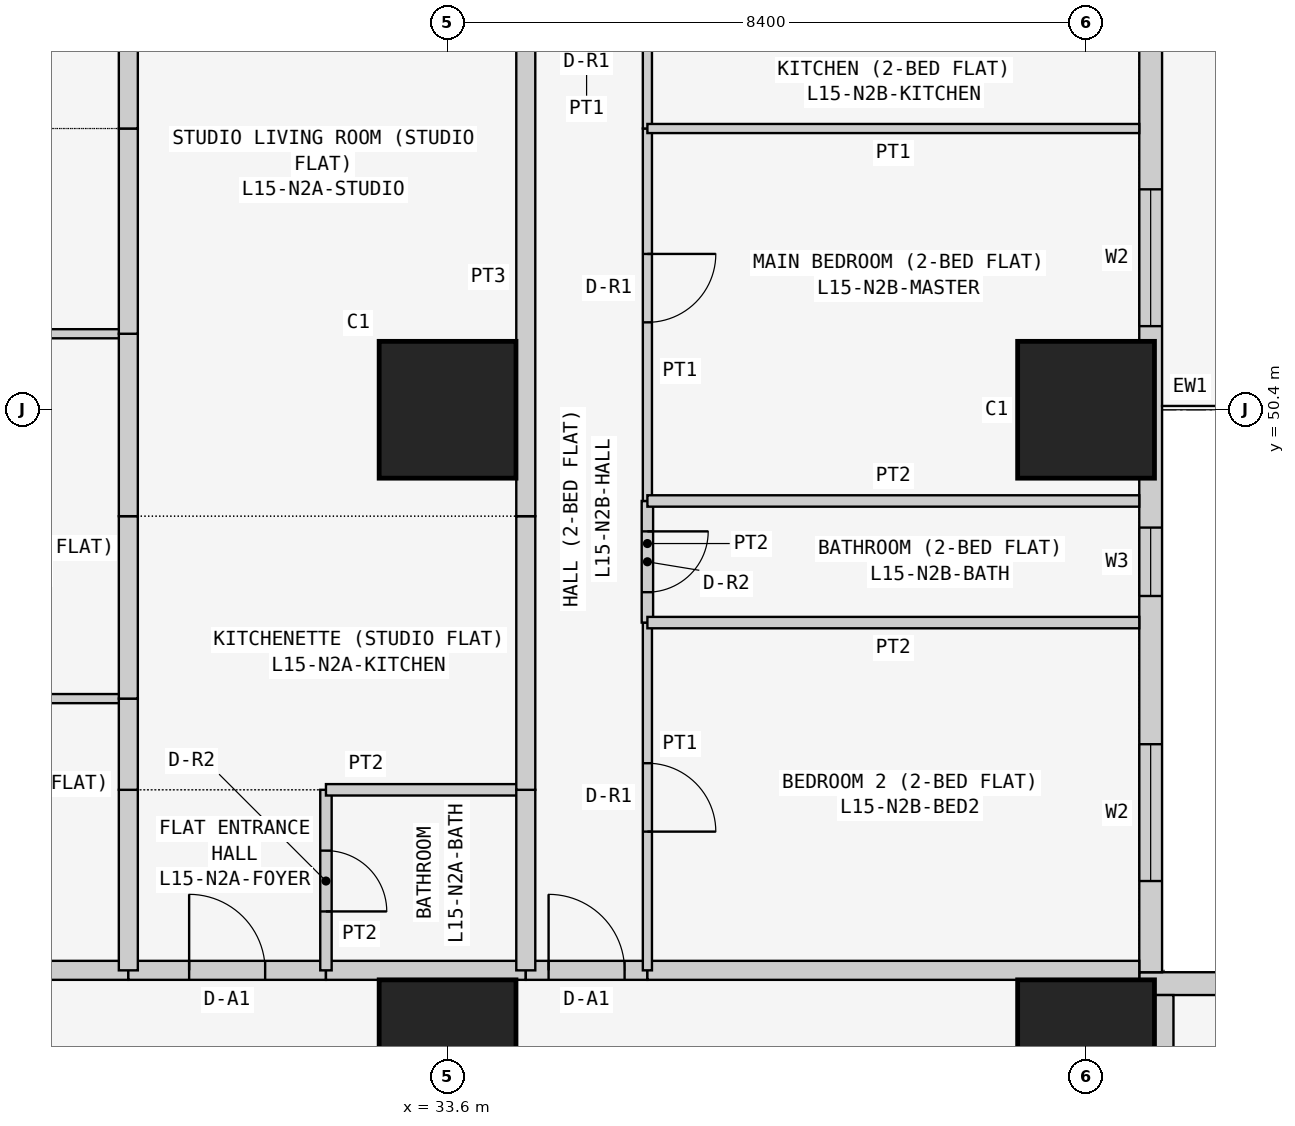
"""IFC4 building model, lengths in metres.
Left out: names, types, materials, properties, quantities, classifications, styles, units other than length and angle.
Written with IfcOpenShell. Run it as: python <this file> out.ifc"""

import sys

from ifc_helpers import new_model, si_unit, direction, frame, frame_2d, origin, origin_2d, place, context, subcontext, project, spatial, rectangle, extrude, element, fill, save


model = new_model("IFC4")
c1 = context("Model", 3, precision=1e-05, world=origin(), true_north=direction((0.0, 1.0)))
c2 = subcontext(c1, "Body", "Model", "MODEL_VIEW")
j1 = project(units=[si_unit("LENGTHUNIT", "METRE"), si_unit("PLANEANGLEUNIT", "RADIAN")], contexts=[c1])
p1 = place(None, origin())
s1 = spatial("IfcSite", under=j1, at=p1, CompositionType="ELEMENT")
p2 = place(p1, origin())
s2 = spatial("IfcBuilding", under=s1, at=p2, CompositionType="ELEMENT")
p3 = place(p2, frame((0.0, 0.0, 63.3)))
s3 = spatial("IfcBuildingStorey", under=s2, at=p3, CompositionType="ELEMENT", Elevation=63.3)
for number, where, z_axis, x_axis in (
    (1, (33.6, 42.0, 0.0), (0.0, 0.0, 1.0), (1.0, 0.0, 0.0)),
    (2, (33.6, 50.4, 0.0), (0.0, 0.0, 1.0), (1.0, 0.0, 0.0)),
    (3, (42.0, 42.0, 0.0), (0.0, 0.0, 1.0), (1.0, 0.0, 0.0)),
    (4, (42.0, 50.4, 0.0), (0.0, 0.0, 1.0), (1.0, 0.0, 0.0)),
):
    element("IfcColumn", number, at=place(p3, frame(where, z_axis=z_axis, x_axis=x_axis)), inside=s3, PredefinedType="COLUMN", context=c2, shape_type="SweptSolid", body=[
        extrude(rectangle(XDim=1.8, YDim=1.8, at=origin_2d()), origin(), (0.0, 0.0, 1.0), 3.6),
    ])
p4 = place(p3, frame((58.4, 42.85, 0.0), z_axis=(0.0, 0.0, 1.0), x_axis=(-1.0, 0.0, 0.0)))
e5 = element("IfcWall", 5, at=p4, inside=s3, PredefinedType="SOLIDWALL", context=c2, shape_type="SweptSolid", body=[
    extrude(rectangle(XDim=15.7, YDim=0.3, at=frame_2d((7.85, 0.0))), origin(), (0.0, 0.0, 1.0), 3.45),
])
p5 = place(p4, frame((12.4, 0.0, 0.9)))
e6 = element("IfcOpeningElement", 6, at=p5, cuts=e5, PredefinedType="OPENING", context=c2, shape_type="SweptSolid", body=[
    extrude(rectangle(XDim=1.8, YDim=1.5, at=frame_2d((0.9, 0.75))), frame((0.0, 0.16, 0.0), z_axis=(0.0, -1.0, 0.0), x_axis=(1.0, 0.0, 0.0)), (0.0, 0.0, 1.0), 0.32),
])
p6 = place(p4, frame((9.55, 0.0, 1.5)))
e7 = element("IfcOpeningElement", 7, at=p6, cuts=e5, PredefinedType="OPENING", context=c2, shape_type="SweptSolid", body=[
    extrude(rectangle(XDim=0.9, YDim=0.7, at=frame_2d((0.45, 0.35))), frame((0.0, 0.16, 0.0), z_axis=(0.0, -1.0, 0.0), x_axis=(1.0, 0.0, 0.0)), (0.0, 0.0, 1.0), 0.32),
])
p7 = place(p4, frame((5.1, 0.0, 0.9)))
e8 = element("IfcOpeningElement", 8, at=p7, cuts=e5, PredefinedType="OPENING", context=c2, shape_type="SweptSolid", body=[
    extrude(rectangle(XDim=1.8, YDim=1.5, at=frame_2d((0.9, 0.75))), frame((0.0, 0.16, 0.0), z_axis=(0.0, -1.0, 0.0), x_axis=(1.0, 0.0, 0.0)), (0.0, 0.0, 1.0), 0.32),
])
p8 = place(p4, frame((2.0, 0.0, 0.0)))
e9 = element("IfcOpeningElement", 9, at=p8, cuts=e5, PredefinedType="OPENING", context=c2, shape_type="SweptSolid", body=[
    extrude(rectangle(XDim=0.9, YDim=2.4, at=frame_2d((0.45, 1.2))), frame((0.0, 0.16, 0.0), z_axis=(0.0, -1.0, 0.0), x_axis=(1.0, 0.0, 0.0)), (0.0, 0.0, 1.0), 0.32),
])
p9 = place(p4, frame((0.7, 0.0, 0.9)))
e10 = element("IfcOpeningElement", 10, at=p9, cuts=e5, PredefinedType="OPENING", context=c2, shape_type="SweptSolid", body=[
    extrude(rectangle(XDim=1.2, YDim=1.5, at=frame_2d((0.6, 0.75))), frame((0.0, 0.16, 0.0), z_axis=(0.0, -1.0, 0.0), x_axis=(1.0, 0.0, 0.0)), (0.0, 0.0, 1.0), 0.32),
])
p10 = place(p3, frame((42.85, 43.0, 0.0), z_axis=(0.0, 0.0, 1.0), x_axis=(0.0, 1.0, 0.0)))
e11 = element("IfcWall", 11, at=p10, inside=s3, PredefinedType="SOLIDWALL", context=c2, shape_type="SweptSolid", body=[
    extrude(rectangle(XDim=15.4, YDim=0.3, at=frame_2d((7.7, 0.0))), origin(), (0.0, 0.0, 1.0), 3.45),
])
p11 = place(p10, frame((1.2, 0.0, 0.9)))
e12 = element("IfcOpeningElement", 12, at=p11, cuts=e11, PredefinedType="OPENING", context=c2, shape_type="SweptSolid", body=[
    extrude(rectangle(XDim=1.8, YDim=1.5, at=frame_2d((0.9, 0.75))), frame((0.0, 0.16, 0.0), z_axis=(0.0, -1.0, 0.0), x_axis=(1.0, 0.0, 0.0)), (0.0, 0.0, 1.0), 0.32),
])
p12 = place(p10, frame((4.95, 0.0, 1.5)))
e13 = element("IfcOpeningElement", 13, at=p12, cuts=e11, PredefinedType="OPENING", context=c2, shape_type="SweptSolid", body=[
    extrude(rectangle(XDim=0.9, YDim=0.7, at=frame_2d((0.45, 0.35))), frame((0.0, 0.16, 0.0), z_axis=(0.0, -1.0, 0.0), x_axis=(1.0, 0.0, 0.0)), (0.0, 0.0, 1.0), 0.32),
])
p13 = place(p10, frame((8.5, 0.0, 0.9)))
e14 = element("IfcOpeningElement", 14, at=p13, cuts=e11, PredefinedType="OPENING", context=c2, shape_type="SweptSolid", body=[
    extrude(rectangle(XDim=1.8, YDim=1.5, at=frame_2d((0.9, 0.75))), frame((0.0, 0.16, 0.0), z_axis=(0.0, -1.0, 0.0), x_axis=(1.0, 0.0, 0.0)), (0.0, 0.0, 1.0), 0.32),
])
p14 = place(p10, frame((12.5, 0.0, 0.0)))
e15 = element("IfcOpeningElement", 15, at=p14, cuts=e11, PredefinedType="OPENING", context=c2, shape_type="SweptSolid", body=[
    extrude(rectangle(XDim=0.9, YDim=2.4, at=frame_2d((0.45, 1.2))), frame((0.0, 0.16, 0.0), z_axis=(0.0, -1.0, 0.0), x_axis=(1.0, 0.0, 0.0)), (0.0, 0.0, 1.0), 0.32),
])
p15 = place(p10, frame((13.5, 0.0, 0.9)))
e16 = element("IfcOpeningElement", 16, at=p15, cuts=e11, PredefinedType="OPENING", context=c2, shape_type="SweptSolid", body=[
    extrude(rectangle(XDim=1.2, YDim=1.5, at=frame_2d((0.6, 0.75))), frame((0.0, 0.16, 0.0), z_axis=(0.0, -1.0, 0.0), x_axis=(1.0, 0.0, 0.0)), (0.0, 0.0, 1.0), 0.32),
])
p16 = place(p3, frame((24.171, 43.025, 0.0), z_axis=(0.0, 0.0, 1.0), x_axis=(1.0, 0.0, 0.0)))
e17 = element("IfcWall", 17, at=p16, inside=s3, PredefinedType="PARTITIONING", context=c2, shape_type="SweptSolid", body=[
    extrude(rectangle(XDim=5.229, YDim=0.25, at=frame_2d((2.615, 0.0))), origin(), (0.0, 0.0, 1.0), 3.45),
])
p17 = place(p16, frame((2.129, 0.0, 0.0)))
e18 = element("IfcOpeningElement", 18, at=p17, cuts=e17, PredefinedType="OPENING", context=c2, shape_type="SweptSolid", body=[
    extrude(rectangle(XDim=1.0, YDim=2.1, at=frame_2d((0.5, 1.05))), frame((0.0, 0.135, 0.0), z_axis=(0.0, -1.0, 0.0), x_axis=(1.0, 0.0, 0.0)), (0.0, 0.0, 1.0), 0.27),
])
p18 = place(p3, frame((29.4, 43.025, 0.0), z_axis=(0.0, 0.0, 1.0), x_axis=(1.0, 0.0, 0.0)))
e19 = element("IfcWall", 19, at=p18, inside=s3, PredefinedType="PARTITIONING", context=c2, shape_type="SweptSolid", body=[
    extrude(rectangle(XDim=2.6, YDim=0.25, at=frame_2d((1.3, 0.0))), origin(), (0.0, 0.0, 1.0), 3.45),
])
p19 = place(p18, frame((0.8, 0.0, 0.0)))
e20 = element("IfcOpeningElement", 20, at=p19, cuts=e19, PredefinedType="OPENING", context=c2, shape_type="SweptSolid", body=[
    extrude(rectangle(XDim=1.0, YDim=2.1, at=frame_2d((0.5, 1.05))), frame((0.0, 0.135, 0.0), z_axis=(0.0, -1.0, 0.0), x_axis=(1.0, 0.0, 0.0)), (0.0, 0.0, 1.0), 0.27),
])
p20 = place(p3, frame((32.0, 43.025, 0.0), z_axis=(0.0, 0.0, 1.0), x_axis=(1.0, 0.0, 0.0)))
e21 = element("IfcWall", 21, at=p20, inside=s3, PredefinedType="PARTITIONING", context=c2, shape_type="SweptSolid", body=[
    extrude(rectangle(XDim=2.629, YDim=0.25, at=frame_2d((1.314, 0.0))), origin(), (0.0, 0.0, 1.0), 3.45),
])
p21 = place(p3, frame((34.629, 43.025, 0.0), z_axis=(0.0, 0.0, 1.0), x_axis=(1.0, 0.0, 0.0)))
e22 = element("IfcWall", 22, at=p21, inside=s3, PredefinedType="PARTITIONING", context=c2, shape_type="SweptSolid", body=[
    extrude(rectangle(XDim=1.6, YDim=0.25, at=frame_2d((0.8, 0.0))), origin(), (0.0, 0.0, 1.0), 3.45),
])
p22 = place(p21, frame((0.3, 0.0, 0.0)))
e23 = element("IfcOpeningElement", 23, at=p22, cuts=e22, PredefinedType="OPENING", context=c2, shape_type="SweptSolid", body=[
    extrude(rectangle(XDim=1.0, YDim=2.1, at=frame_2d((0.5, 1.05))), frame((0.0, 0.135, 0.0), z_axis=(0.0, -1.0, 0.0), x_axis=(1.0, 0.0, 0.0)), (0.0, 0.0, 1.0), 0.27),
])
p23 = place(p3, frame((36.229, 43.025, 0.0), z_axis=(0.0, 0.0, 1.0), x_axis=(1.0, 0.0, 0.0)))
e24 = element("IfcWall", 24, at=p23, inside=s3, PredefinedType="PARTITIONING", context=c2, shape_type="SweptSolid", body=[
    extrude(rectangle(XDim=6.471, YDim=0.25, at=frame_2d((3.235, 0.0))), origin(), (0.0, 0.0, 1.0), 3.45),
])
p24 = place(p3, frame((43.025, 42.7, 0.0), z_axis=(0.0, 0.0, 1.0), x_axis=(0.0, -1.0, 0.0)))
e25 = element("IfcWall", 25, at=p24, inside=s3, PredefinedType="PARTITIONING", context=c2, shape_type="SweptSolid", body=[
    extrude(rectangle(XDim=6.871, YDim=0.25, at=frame_2d((3.436, 0.0))), origin(), (0.0, 0.0, 1.0), 3.45),
])
p25 = place(p3, frame((29.4, 46.6, 0.0), z_axis=(0.0, 0.0, 1.0), x_axis=(-1.0, 0.0, 0.0)))
e26 = element("IfcWall", 26, at=p25, inside=s3, PredefinedType="PARTITIONING", context=c2, shape_type="SweptSolid", body=[
    extrude(rectangle(XDim=5.229, YDim=0.12, at=frame_2d((2.615, 0.0))), origin(), (0.0, 0.0, 1.0), 3.45),
])
p26 = place(p3, frame((29.4, 43.025, 0.0), z_axis=(0.0, 0.0, 1.0), x_axis=(0.0, 1.0, 0.0)))
e27 = element("IfcWall", 27, at=p26, inside=s3, PredefinedType="PARTITIONING", context=c2, shape_type="SweptSolid", body=[
    extrude(rectangle(XDim=2.375, YDim=0.25, at=frame_2d((1.188, 0.0))), origin(), (0.0, 0.0, 1.0), 2.848),
])
p27 = place(p3, frame((29.4, 45.4, 0.0), z_axis=(0.0, 0.0, 1.0), x_axis=(0.0, 1.0, 0.0)))
e28 = element("IfcWall", 28, at=p27, inside=s3, PredefinedType="PARTITIONING", context=c2, shape_type="SweptSolid", body=[
    extrude(rectangle(XDim=1.2, YDim=0.25, at=frame_2d((0.6, 0.0))), origin(), (0.0, 0.0, 1.0), 2.848),
])
p28 = place(p3, frame((29.4, 51.4, 0.0), z_axis=(0.0, 0.0, 1.0), x_axis=(-1.0, 0.0, 0.0)))
e29 = element("IfcWall", 29, at=p28, inside=s3, PredefinedType="PARTITIONING", context=c2, shape_type="SweptSolid", body=[
    extrude(rectangle(XDim=5.229, YDim=0.12, at=frame_2d((2.615, 0.0))), origin(), (0.0, 0.0, 1.0), 3.45),
])
for number, where, z_axis, x_axis in (
    (30, (29.4, 46.6, 0.0), (0.0, 0.0, 1.0), (0.0, 1.0, 0.0)),
    (31, (29.4, 49.0, 0.0), (0.0, 0.0, 1.0), (0.0, 1.0, 0.0)),
):
    element("IfcWall", number, at=place(p3, frame(where, z_axis=z_axis, x_axis=x_axis)), inside=s3, PredefinedType="PARTITIONING", context=c2, shape_type="SweptSolid", body=[
        extrude(rectangle(XDim=2.4, YDim=0.25, at=frame_2d((1.2, 0.0))), origin(), (0.0, 0.0, 1.0), 2.848),
    ])
p29 = place(p3, frame((29.4, 51.4, 0.0), z_axis=(0.0, 0.0, 1.0), x_axis=(0.0, 1.0, 0.0)))
e32 = element("IfcWall", 32, at=p29, inside=s3, PredefinedType="PARTITIONING", context=c2, shape_type="SweptSolid", body=[
    extrude(rectangle(XDim=2.7, YDim=0.25, at=frame_2d((1.35, 0.0))), origin(), (0.0, 0.0, 1.0), 2.848),
])
p30 = place(p3, frame((29.4, 54.1, 0.0), z_axis=(0.0, 0.0, 1.0), x_axis=(0.0, 1.0, 0.0)))
e33 = element("IfcWall", 33, at=p30, inside=s3, PredefinedType="PARTITIONING", context=c2, shape_type="SweptSolid", body=[
    extrude(rectangle(XDim=5.35, YDim=0.25, at=frame_2d((2.675, 0.0))), origin(), (0.0, 0.0, 1.0), 2.848),
])
p31 = place(p3, frame((32.0, 45.4, 0.0), z_axis=(0.0, 0.0, 1.0), x_axis=(0.0, -1.0, 0.0)))
e34 = element("IfcWall", 34, at=p31, inside=s3, PredefinedType="PARTITIONING", context=c2, shape_type="SweptSolid", body=[
    extrude(rectangle(XDim=2.375, YDim=0.15, at=frame_2d((1.188, 0.0))), origin(), (0.0, 0.0, 1.0), 3.45),
])
p32 = place(p31, frame((0.8, 0.0, 0.0)))
e35 = element("IfcOpeningElement", 35, at=p32, cuts=e34, PredefinedType="OPENING", context=c2, shape_type="SweptSolid", body=[
    extrude(rectangle(XDim=0.8, YDim=2.1, at=frame_2d((0.4, 1.05))), frame((0.0, 0.085, 0.0), z_axis=(0.0, -1.0, 0.0), x_axis=(1.0, 0.0, 0.0)), (0.0, 0.0, 1.0), 0.17),
])
p33 = place(p3, frame((32.0, 45.4, 0.0), z_axis=(0.0, 0.0, 1.0), x_axis=(1.0, 0.0, 0.0)))
e36 = element("IfcWall", 36, at=p33, inside=s3, PredefinedType="PARTITIONING", context=c2, shape_type="SweptSolid", body=[
    extrude(rectangle(XDim=2.629, YDim=0.15, at=frame_2d((1.314, 0.0))), origin(), (0.0, 0.0, 1.0), 3.45),
])
p34 = place(p3, frame((34.629, 45.4, 0.0), z_axis=(0.0, 0.0, 1.0), x_axis=(0.0, -1.0, 0.0)))
e37 = element("IfcWall", 37, at=p34, inside=s3, PredefinedType="PARTITIONING", context=c2, shape_type="SweptSolid", body=[
    extrude(rectangle(XDim=2.375, YDim=0.25, at=frame_2d((1.188, 0.0))), origin(), (0.0, 0.0, 1.0), 3.45),
])
p35 = place(p3, frame((34.629, 49.0, 0.0), z_axis=(0.0, 0.0, 1.0), x_axis=(0.0, -1.0, 0.0)))
e38 = element("IfcWall", 38, at=p35, inside=s3, PredefinedType="PARTITIONING", context=c2, shape_type="SweptSolid", body=[
    extrude(rectangle(XDim=3.6, YDim=0.25, at=frame_2d((1.8, 0.0))), origin(), (0.0, 0.0, 1.0), 3.45),
])
p36 = place(p3, frame((34.629, 55.3, 0.0), z_axis=(0.0, 0.0, 1.0), x_axis=(0.0, -1.0, 0.0)))
e39 = element("IfcWall", 39, at=p36, inside=s3, PredefinedType="PARTITIONING", context=c2, shape_type="SweptSolid", body=[
    extrude(rectangle(XDim=6.3, YDim=0.25, at=frame_2d((3.15, 0.0))), origin(), (0.0, 0.0, 1.0), 3.45),
])
p37 = place(p3, frame((36.229, 47.6, 0.0), z_axis=(0.0, 0.0, 1.0), x_axis=(0.0, -1.0, 0.0)))
e40 = element("IfcWall", 40, at=p37, inside=s3, PredefinedType="PARTITIONING", context=c2, shape_type="SweptSolid", body=[
    extrude(rectangle(XDim=4.575, YDim=0.12, at=frame_2d((2.288, 0.0))), origin(), (0.0, 0.0, 1.0), 3.45),
])
p38 = place(p37, frame((1.85, 0.0, 0.0)))
e41 = element("IfcOpeningElement", 41, at=p38, cuts=e40, PredefinedType="OPENING", context=c2, shape_type="SweptSolid", body=[
    extrude(rectangle(XDim=0.9, YDim=2.1, at=frame_2d((0.45, 1.05))), frame((0.0, 0.07, 0.0), z_axis=(0.0, -1.0, 0.0), x_axis=(1.0, 0.0, 0.0)), (0.0, 0.0, 1.0), 0.14),
])
p39 = place(p3, frame((36.229, 49.2, 0.0), z_axis=(0.0, 0.0, 1.0), x_axis=(0.0, -1.0, 0.0)))
e42 = element("IfcWall", 42, at=p39, inside=s3, PredefinedType="PARTITIONING", context=c2, shape_type="SweptSolid", body=[
    extrude(rectangle(XDim=1.6, YDim=0.15, at=frame_2d((0.8, 0.0))), origin(), (0.0, 0.0, 1.0), 3.45),
])
p40 = place(p39, frame((0.4, 0.0, 0.0)))
e43 = element("IfcOpeningElement", 43, at=p40, cuts=e42, PredefinedType="OPENING", context=c2, shape_type="SweptSolid", body=[
    extrude(rectangle(XDim=0.8, YDim=2.1, at=frame_2d((0.4, 1.05))), frame((0.0, 0.085, 0.0), z_axis=(0.0, -1.0, 0.0), x_axis=(1.0, 0.0, 0.0)), (0.0, 0.0, 1.0), 0.17),
])
p41 = place(p3, frame((36.229, 54.1, 0.0), z_axis=(0.0, 0.0, 1.0), x_axis=(0.0, -1.0, 0.0)))
e44 = element("IfcWall", 44, at=p41, inside=s3, PredefinedType="PARTITIONING", context=c2, shape_type="SweptSolid", body=[
    extrude(rectangle(XDim=4.9, YDim=0.12, at=frame_2d((2.45, 0.0))), origin(), (0.0, 0.0, 1.0), 3.45),
])
p42 = place(p41, frame((1.65, 0.0, 0.0)))
e45 = element("IfcOpeningElement", 45, at=p42, cuts=e44, PredefinedType="OPENING", context=c2, shape_type="SweptSolid", body=[
    extrude(rectangle(XDim=0.9, YDim=2.1, at=frame_2d((0.45, 1.05))), frame((0.0, 0.07, 0.0), z_axis=(0.0, -1.0, 0.0), x_axis=(1.0, 0.0, 0.0)), (0.0, 0.0, 1.0), 0.14),
])
p43 = place(p3, frame((36.229, 55.3, 0.0), z_axis=(0.0, 0.0, 1.0), x_axis=(0.0, -1.0, 0.0)))
e46 = element("IfcWall", 46, at=p43, inside=s3, PredefinedType="PARTITIONING", context=c2, shape_type="SweptSolid", body=[
    extrude(rectangle(XDim=1.2, YDim=0.12, at=frame_2d((0.6, 0.0))), origin(), (0.0, 0.0, 1.0), 3.45),
])
for number, where, z_axis, x_axis in (
    (47, (36.229, 47.6, 0.0), (0.0, 0.0, 1.0), (1.0, 0.0, 0.0)),
    (48, (36.229, 49.2, 0.0), (0.0, 0.0, 1.0), (1.0, 0.0, 0.0)),
):
    element("IfcWall", number, at=place(p3, frame(where, z_axis=z_axis, x_axis=x_axis)), inside=s3, PredefinedType="PARTITIONING", context=c2, shape_type="SweptSolid", body=[
        extrude(rectangle(XDim=6.471, YDim=0.15, at=frame_2d((3.235, 0.0))), origin(), (0.0, 0.0, 1.0), 3.45),
    ])
p44 = place(p3, frame((36.229, 54.1, 0.0), z_axis=(0.0, 0.0, 1.0), x_axis=(1.0, 0.0, 0.0)))
e49 = element("IfcWall", 49, at=p44, inside=s3, PredefinedType="PARTITIONING", context=c2, shape_type="SweptSolid", body=[
    extrude(rectangle(XDim=6.471, YDim=0.12, at=frame_2d((3.235, 0.0))), origin(), (0.0, 0.0, 1.0), 3.45),
])
p45 = place(p11, origin())
e50 = element("IfcWindow", 50, at=p45, inside=s3, PartitioningType="SINGLE_PANEL", PredefinedType="WINDOW", context=c2, shape_type="SweptSolid", body=[
    extrude(rectangle(XDim=1.8, YDim=1.5, at=frame_2d((0.9, 0.75))), frame((0.0, 0.03, 0.0), z_axis=(0.0, -1.0, 0.0), x_axis=(1.0, 0.0, 0.0)), (0.0, 0.0, 1.0), 0.06),
])
fill(e12, e50)
p46 = place(p12, origin())
e51 = element("IfcWindow", 51, at=p46, inside=s3, PartitioningType="SINGLE_PANEL", PredefinedType="WINDOW", context=c2, shape_type="SweptSolid", body=[
    extrude(rectangle(XDim=0.9, YDim=0.7, at=frame_2d((0.45, 0.35))), frame((0.0, 0.03, 0.0), z_axis=(0.0, -1.0, 0.0), x_axis=(1.0, 0.0, 0.0)), (0.0, 0.0, 1.0), 0.06),
])
fill(e13, e51)
p47 = place(p13, origin())
e52 = element("IfcWindow", 52, at=p47, inside=s3, PartitioningType="SINGLE_PANEL", PredefinedType="WINDOW", context=c2, shape_type="SweptSolid", body=[
    extrude(rectangle(XDim=1.8, YDim=1.5, at=frame_2d((0.9, 0.75))), frame((0.0, 0.03, 0.0), z_axis=(0.0, -1.0, 0.0), x_axis=(1.0, 0.0, 0.0)), (0.0, 0.0, 1.0), 0.06),
])
fill(e14, e52)
p48 = place(p19, origin())
e53 = element("IfcDoor", 53, at=p48, inside=s3, OperationType="SINGLE_SWING_LEFT", PredefinedType="DOOR", context=c2, shape_type="SweptSolid", body=[
    extrude(rectangle(XDim=1.0, YDim=2.1, at=frame_2d((0.5, 1.05))), frame((0.0, 0.025, 0.0), z_axis=(0.0, -1.0, 0.0), x_axis=(1.0, 0.0, 0.0)), (0.0, 0.0, 1.0), 0.05),
])
fill(e20, e53)
p49 = place(p32, origin())
e54 = element("IfcDoor", 54, at=p49, inside=s3, OperationType="SINGLE_SWING_RIGHT", PredefinedType="DOOR", context=c2, shape_type="SweptSolid", body=[
    extrude(rectangle(XDim=0.8, YDim=2.1, at=frame_2d((0.4, 1.05))), frame((0.0, 0.025, 0.0), z_axis=(0.0, -1.0, 0.0), x_axis=(1.0, 0.0, 0.0)), (0.0, 0.0, 1.0), 0.05),
])
fill(e35, e54)
p50 = place(p22, origin())
e55 = element("IfcDoor", 55, at=p50, inside=s3, OperationType="SINGLE_SWING_LEFT", PredefinedType="DOOR", context=c2, shape_type="SweptSolid", body=[
    extrude(rectangle(XDim=1.0, YDim=2.1, at=frame_2d((0.5, 1.05))), frame((0.0, 0.025, 0.0), z_axis=(0.0, -1.0, 0.0), x_axis=(1.0, 0.0, 0.0)), (0.0, 0.0, 1.0), 0.05),
])
fill(e23, e55)
p51 = place(p38, origin())
e56 = element("IfcDoor", 56, at=p51, inside=s3, OperationType="SINGLE_SWING_RIGHT", PredefinedType="DOOR", context=c2, shape_type="SweptSolid", body=[
    extrude(rectangle(XDim=0.9, YDim=2.1, at=frame_2d((0.45, 1.05))), frame((0.0, 0.025, 0.0), z_axis=(0.0, -1.0, 0.0), x_axis=(1.0, 0.0, 0.0)), (0.0, 0.0, 1.0), 0.05),
])
fill(e41, e56)
p52 = place(p40, origin())
e57 = element("IfcDoor", 57, at=p52, inside=s3, OperationType="SINGLE_SWING_LEFT", PredefinedType="DOOR", context=c2, shape_type="SweptSolid", body=[
    extrude(rectangle(XDim=0.8, YDim=2.1, at=frame_2d((0.4, 1.05))), frame((0.0, 0.025, 0.0), z_axis=(0.0, -1.0, 0.0), x_axis=(1.0, 0.0, 0.0)), (0.0, 0.0, 1.0), 0.05),
])
fill(e43, e57)
p53 = place(p42, origin())
e58 = element("IfcDoor", 58, at=p53, inside=s3, OperationType="SINGLE_SWING_LEFT", PredefinedType="DOOR", context=c2, shape_type="SweptSolid", body=[
    extrude(rectangle(XDim=0.9, YDim=2.1, at=frame_2d((0.45, 1.05))), frame((0.0, 0.025, 0.0), z_axis=(0.0, -1.0, 0.0), x_axis=(1.0, 0.0, 0.0)), (0.0, 0.0, 1.0), 0.05),
])
fill(e45, e58)
save(model, sys.argv[1])
